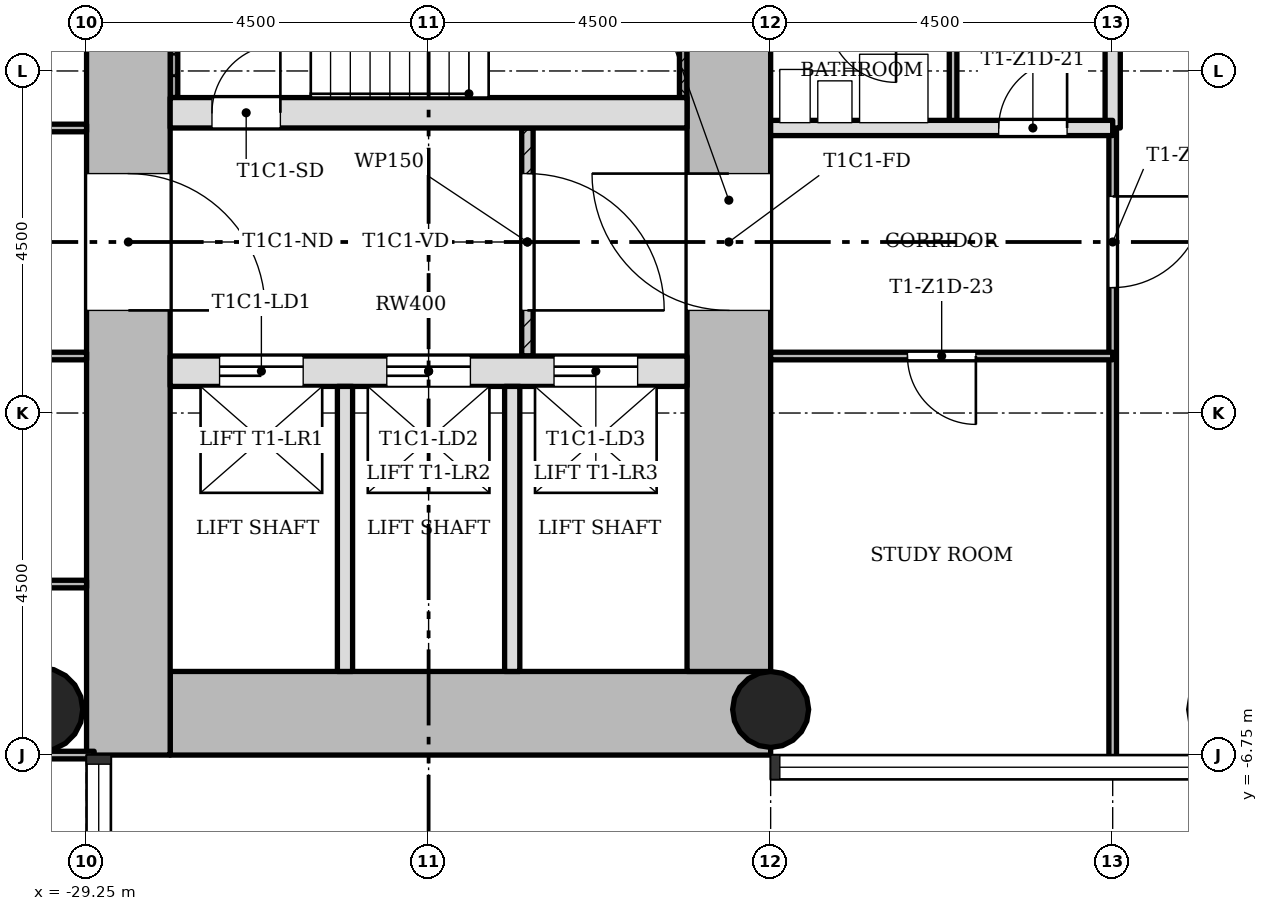
"""IFC4 building model, lengths in metres.
Left out: names, types, materials, properties, quantities, classifications, styles, units other than length and angle.
Written with IfcOpenShell. Run it as: python <this file> out.ifc"""

import sys

from ifc_helpers import new_model, si_unit, direction, frame, frame_2d, origin, origin_2d, place, context, subcontext, project, spatial, rectangle, hollow_circle, extrude, element, fill, save


model = new_model("IFC4")
c1 = context("Model", 3, precision=1e-05, world=origin(), true_north=direction((0.0, 1.0)))
c2 = subcontext(c1, "Body", "Model", "MODEL_VIEW")
j1 = project(units=[si_unit("LENGTHUNIT", "METRE"), si_unit("PLANEANGLEUNIT", "RADIAN")], contexts=[c1])
p1 = place(None, origin())
s1 = spatial("IfcSite", under=j1, at=p1, CompositionType="ELEMENT")
p2 = place(p1, origin())
s2 = spatial("IfcBuilding", under=s1, at=p2, CompositionType="ELEMENT")
p3 = place(p2, frame((0.0, 0.0, 61.9)))
s3 = spatial("IfcBuildingStorey", under=s2, at=p3, CompositionType="ELEMENT", Elevation=61.9)
p4 = place(p3, frame((-28.15, -6.2, 0.0), z_axis=(0.0, 0.0, 1.0), x_axis=(1.0, 0.0, 0.0)))
e1 = element("IfcWall", 1, at=p4, inside=s3, PredefinedType="SHEAR", context=c2, shape_type="SweptSolid", body=[
    extrude(rectangle(XDim=7.9, YDim=1.1, at=frame_2d((3.95, 0.0))), origin(), (0.0, 0.0, 1.0), 3.4),
])
p5 = place(p3, frame((-20.8, -5.65, 0.0), z_axis=(0.0, 0.0, 1.0), x_axis=(0.0, 1.0, 0.0)))
e2 = element("IfcWall", 2, at=p5, inside=s3, PredefinedType="SHEAR", context=c2, shape_type="SweptSolid", body=[
    extrude(rectangle(XDim=12.4, YDim=1.1, at=frame_2d((6.2, 0.0))), origin(), (0.0, 0.0, 1.0), 3.4),
])
p6 = place(p5, frame((4.75, 0.0, 0.0)))
e3 = element("IfcOpeningElement", 3, at=p6, cuts=e2, PredefinedType="OPENING", context=c2, shape_type="SweptSolid", body=[
    extrude(rectangle(XDim=1.8, YDim=2.1, at=frame_2d((0.9, 1.05))), frame((0.0, 0.56, 0.0), z_axis=(0.0, -1.0, 0.0), x_axis=(1.0, 0.0, 0.0)), (0.0, 0.0, 1.0), 1.12),
])
p7 = place(p3, frame((-28.7, 5.65, 0.0), z_axis=(0.0, 0.0, 1.0), x_axis=(0.0, -1.0, 0.0)))
e4 = element("IfcWall", 4, at=p7, inside=s3, PredefinedType="SHEAR", context=c2, shape_type="SweptSolid", body=[
    extrude(rectangle(XDim=12.4, YDim=1.1, at=frame_2d((6.2, 0.0))), origin(), (0.0, 0.0, 1.0), 3.4),
])
p8 = place(p7, frame((4.75, 0.0, 0.0)))
e5 = element("IfcOpeningElement", 5, at=p8, cuts=e4, PredefinedType="OPENING", context=c2, shape_type="SweptSolid", body=[
    extrude(rectangle(XDim=1.8, YDim=2.1, at=frame_2d((0.9, 1.05))), frame((0.0, 0.56, 0.0), z_axis=(0.0, -1.0, 0.0), x_axis=(1.0, 0.0, 0.0)), (0.0, 0.0, 1.0), 1.12),
])
p9 = place(p3, frame((-28.15, -1.7, 0.0), z_axis=(0.0, 0.0, 1.0), x_axis=(1.0, 0.0, 0.0)))
e6 = element("IfcWall", 6, at=p9, inside=s3, PredefinedType="SHEAR", context=c2, shape_type="SweptSolid", body=[
    extrude(rectangle(XDim=6.8, YDim=0.4, at=frame_2d((3.4, 0.0))), origin(), (0.0, 0.0, 1.0), 3.4),
])
p10 = place(p9, frame((0.65, 0.0, 0.0)))
e7 = element("IfcOpeningElement", 7, at=p10, cuts=e6, PredefinedType="OPENING", context=c2, shape_type="SweptSolid", body=[
    extrude(rectangle(XDim=1.1, YDim=2.1, at=frame_2d((0.55, 1.05))), frame((0.0, 0.21, 0.0), z_axis=(0.0, -1.0, 0.0), x_axis=(1.0, 0.0, 0.0)), (0.0, 0.0, 1.0), 0.42),
])
p11 = place(p9, frame((2.85, 0.0, 0.0)))
e8 = element("IfcOpeningElement", 8, at=p11, cuts=e6, PredefinedType="OPENING", context=c2, shape_type="SweptSolid", body=[
    extrude(rectangle(XDim=1.1, YDim=2.1, at=frame_2d((0.55, 1.05))), frame((0.0, 0.21, 0.0), z_axis=(0.0, -1.0, 0.0), x_axis=(1.0, 0.0, 0.0)), (0.0, 0.0, 1.0), 0.42),
])
p12 = place(p9, frame((5.05, 0.0, 0.0)))
e9 = element("IfcOpeningElement", 9, at=p12, cuts=e6, PredefinedType="OPENING", context=c2, shape_type="SweptSolid", body=[
    extrude(rectangle(XDim=1.1, YDim=2.1, at=frame_2d((0.55, 1.05))), frame((0.0, 0.21, 0.0), z_axis=(0.0, -1.0, 0.0), x_axis=(1.0, 0.0, 0.0)), (0.0, 0.0, 1.0), 0.42),
])
p13 = place(p3, frame((-28.15, 1.7, 0.0), z_axis=(0.0, 0.0, 1.0), x_axis=(1.0, 0.0, 0.0)))
e10 = element("IfcWall", 10, at=p13, inside=s3, PredefinedType="SHEAR", context=c2, shape_type="SweptSolid", body=[
    extrude(rectangle(XDim=6.8, YDim=0.4, at=frame_2d((3.4, 0.0))), origin(), (0.0, 0.0, 1.0), 3.4),
])
p14 = place(p13, frame((0.55, 0.0, 0.0)))
e11 = element("IfcOpeningElement", 11, at=p14, cuts=e10, PredefinedType="OPENING", context=c2, shape_type="SweptSolid", body=[
    extrude(rectangle(XDim=0.9, YDim=2.1, at=frame_2d((0.45, 1.05))), frame((0.0, 0.21, 0.0), z_axis=(0.0, -1.0, 0.0), x_axis=(1.0, 0.0, 0.0)), (0.0, 0.0, 1.0), 0.42),
])
p15 = place(p3, frame((-20.25, -6.15, 0.0), z_axis=(0.0, 0.0, 1.0), x_axis=(1.0, 0.0, 0.0)))
e12 = element("IfcColumn", 12, at=p15, inside=s3, PredefinedType="COLUMN", context=c2, shape_type="SweptSolid", body=[
    extrude(hollow_circle(Radius=0.5, WallThickness=0.036, at=origin_2d()), origin(), (0.0, 0.0, 1.0), 3.4),
])
p16 = place(p3, frame((-29.85, -6.15, 0.0), z_axis=(0.0, 0.0, 1.0), x_axis=(1.0, 0.0, 0.0)))
e13 = element("IfcColumn", 13, at=p16, inside=s3, PredefinedType="COLUMN", context=c2, shape_type="SweptSolid", body=[
    extrude(hollow_circle(Radius=0.55, WallThickness=0.04, at=origin_2d()), origin(), (0.0, 0.0, 1.0), 3.4),
])
p17 = place(p3, frame((-23.45, -1.5, 0.0), z_axis=(0.0, 0.0, 1.0), x_axis=(0.0, 1.0, 0.0)))
e14 = element("IfcWall", 14, at=p17, inside=s3, PredefinedType="PARTITIONING", context=c2, shape_type="SweptSolid", body=[
    extrude(rectangle(XDim=3.0, YDim=0.15, at=frame_2d((1.5, 0.0))), origin(), (0.0, 0.0, 1.0), 3.0),
])
p18 = place(p17, frame((0.6, 0.0, 0.0)))
e15 = element("IfcOpeningElement", 15, at=p18, cuts=e14, PredefinedType="OPENING", context=c2, shape_type="SweptSolid", body=[
    extrude(rectangle(XDim=1.8, YDim=2.1, at=frame_2d((0.9, 1.05))), frame((0.0, 0.085, 0.0), z_axis=(0.0, -1.0, 0.0), x_axis=(1.0, 0.0, 0.0)), (0.0, 0.0, 1.0), 0.17),
])
for number, where, z_axis, x_axis in (
    (16, (-25.85, -5.65, 0.0), (0.0, 0.0, 1.0), (0.0, 1.0, 0.0)),
    (17, (-23.65, -5.65, 0.0), (0.0, 0.0, 1.0), (0.0, 1.0, 0.0)),
):
    element("IfcWall", number, at=place(p3, frame(where, z_axis=z_axis, x_axis=x_axis)), inside=s3, PredefinedType="SOLIDWALL", context=c2, shape_type="SweptSolid", body=[
        extrude(rectangle(XDim=3.75, YDim=0.2, at=frame_2d((1.875, 0.0))), origin(), (0.0, 0.0, 1.0), 3.0),
    ])
p19 = place(p3, frame((-17.85, 1.5, 0.0), z_axis=(0.0, 0.0, 1.0), x_axis=(0.0, 1.0, 0.0)))
e18 = element("IfcWall", 18, at=p19, inside=s3, PredefinedType="PARTITIONING", context=c2, shape_type="SweptSolid", body=[
    extrude(rectangle(XDim=1.5, YDim=0.1, at=frame_2d((0.75, 0.0))), origin(), (0.0, 0.0, 1.0), 3.0),
])
p20 = place(p3, frame((-15.75, -6.85, 0.0), z_axis=(0.0, 0.0, 1.0), x_axis=(0.0, 1.0, 0.0)))
e19 = element("IfcWall", 19, at=p20, inside=s3, PredefinedType="PARTITIONING", context=c2, shape_type="SweptSolid", body=[
    extrude(rectangle(XDim=8.35, YDim=0.1, at=frame_2d((4.175, 0.0))), origin(), (0.0, 0.0, 1.0), 3.0),
])
p21 = place(p20, frame((6.25, 0.0, 0.0)))
e20 = element("IfcOpeningElement", 20, at=p21, cuts=e19, PredefinedType="OPENING", context=c2, shape_type="SweptSolid", body=[
    extrude(rectangle(XDim=1.2, YDim=2.1, at=frame_2d((0.6, 1.05))), frame((0.0, 0.06, 0.0), z_axis=(0.0, -1.0, 0.0), x_axis=(1.0, 0.0, 0.0)), (0.0, 0.0, 1.0), 0.12),
])
p22 = place(p3, frame((-15.75, 1.5, 0.0), z_axis=(0.0, 0.0, 1.0), x_axis=(0.0, 1.0, 0.0)))
e21 = element("IfcWall", 21, at=p22, inside=s3, PredefinedType="SOLIDWALL", context=c2, shape_type="SweptSolid", body=[
    extrude(rectangle(XDim=5.35, YDim=0.2, at=frame_2d((2.675, 0.0))), origin(), (0.0, 0.0, 1.0), 3.0),
])
p23 = place(p3, frame((-35.1, -6.75, 0.0), z_axis=(0.0, 0.0, 1.0), x_axis=(1.0, 0.0, 0.0)))
e22 = element("IfcWall", 22, at=p23, inside=s3, PredefinedType="PARTITIONING", context=c2, shape_type="SweptSolid", body=[
    extrude(rectangle(XDim=5.95, YDim=0.1, at=frame_2d((2.975, 0.0))), origin(), (0.0, 0.0, 1.0), 3.0),
])
p24 = place(p3, frame((-35.1, -4.5, 0.0), z_axis=(0.0, 0.0, 1.0), x_axis=(1.0, 0.0, 0.0)))
e23 = element("IfcWall", 23, at=p24, inside=s3, PredefinedType="PARTITIONING", context=c2, shape_type="SweptSolid", body=[
    extrude(rectangle(XDim=5.85, YDim=0.1, at=frame_2d((2.925, 0.0))), origin(), (0.0, 0.0, 1.0), 3.0),
])
p25 = place(p3, frame((-35.1, -1.5, 0.0), z_axis=(0.0, 0.0, 1.0), x_axis=(1.0, 0.0, 0.0)))
e24 = element("IfcWall", 24, at=p25, inside=s3, PredefinedType="PARTITIONING", context=c2, shape_type="SweptSolid", body=[
    extrude(rectangle(XDim=5.85, YDim=0.1, at=frame_2d((2.925, 0.0))), origin(), (0.0, 0.0, 1.0), 3.0),
])
p26 = place(p25, frame((2.475, 0.0, 0.0)))
e25 = element("IfcOpeningElement", 25, at=p26, cuts=e24, PredefinedType="OPENING", context=c2, shape_type="SweptSolid", body=[
    extrude(rectangle(XDim=0.9, YDim=2.1, at=frame_2d((0.45, 1.05))), frame((0.0, 0.06, 0.0), z_axis=(0.0, -1.0, 0.0), x_axis=(1.0, 0.0, 0.0)), (0.0, 0.0, 1.0), 0.12),
])
p27 = place(p3, frame((-20.25, -1.5, 0.0), z_axis=(0.0, 0.0, 1.0), x_axis=(1.0, 0.0, 0.0)))
e26 = element("IfcWall", 26, at=p27, inside=s3, PredefinedType="PARTITIONING", context=c2, shape_type="SweptSolid", body=[
    extrude(rectangle(XDim=4.5, YDim=0.1, at=frame_2d((2.25, 0.0))), origin(), (0.0, 0.0, 1.0), 3.0),
])
p28 = place(p27, frame((1.8, 0.0, 0.0)))
e27 = element("IfcOpeningElement", 27, at=p28, cuts=e26, PredefinedType="OPENING", context=c2, shape_type="SweptSolid", body=[
    extrude(rectangle(XDim=0.9, YDim=2.1, at=frame_2d((0.45, 1.05))), frame((0.0, 0.06, 0.0), z_axis=(0.0, -1.0, 0.0), x_axis=(1.0, 0.0, 0.0)), (0.0, 0.0, 1.0), 0.12),
])
p29 = place(p3, frame((-35.1, 1.5, 0.0), z_axis=(0.0, 0.0, 1.0), x_axis=(1.0, 0.0, 0.0)))
e28 = element("IfcWall", 28, at=p29, inside=s3, PredefinedType="PARTITIONING", context=c2, shape_type="SweptSolid", body=[
    extrude(rectangle(XDim=5.85, YDim=0.1, at=frame_2d((2.925, 0.0))), origin(), (0.0, 0.0, 1.0), 3.0),
])
p30 = place(p29, frame((3.675, 0.0, 0.0)))
e29 = element("IfcOpeningElement", 29, at=p30, cuts=e28, PredefinedType="OPENING", context=c2, shape_type="SweptSolid", body=[
    extrude(rectangle(XDim=0.9, YDim=2.1, at=frame_2d((0.45, 1.05))), frame((0.0, 0.06, 0.0), z_axis=(0.0, -1.0, 0.0), x_axis=(1.0, 0.0, 0.0)), (0.0, 0.0, 1.0), 0.12),
])
p31 = place(p3, frame((-20.25, 1.5, 0.0), z_axis=(0.0, 0.0, 1.0), x_axis=(1.0, 0.0, 0.0)))
e30 = element("IfcWall", 30, at=p31, inside=s3, PredefinedType="SOLIDWALL", context=c2, shape_type="SweptSolid", body=[
    extrude(rectangle(XDim=4.5, YDim=0.2, at=frame_2d((2.25, 0.0))), origin(), (0.0, 0.0, 1.0), 3.0),
])
p32 = place(p31, frame((3.0, 0.0, 0.0)))
e31 = element("IfcOpeningElement", 31, at=p32, cuts=e30, PredefinedType="OPENING", context=c2, shape_type="SweptSolid", body=[
    extrude(rectangle(XDim=0.9, YDim=2.1, at=frame_2d((0.45, 1.05))), frame((0.0, 0.11, 0.0), z_axis=(0.0, -1.0, 0.0), x_axis=(1.0, 0.0, 0.0)), (0.0, 0.0, 1.0), 0.22),
])
for number, where, z_axis, x_axis in (
    (32, (-21.4, 1.9, 0.0), (0.0, 0.0, 1.0), (0.0, 1.0, 0.0)),
    (33, (-28.1, 1.9, 0.0), (0.0, 0.0, 1.0), (0.0, 1.0, 0.0)),
):
    element("IfcWall", number, at=place(p3, frame(where, z_axis=z_axis, x_axis=x_axis)), inside=s3, PredefinedType="SHEAR", context=c2, shape_type="SweptSolid", body=[
        extrude(rectangle(XDim=3.75, YDim=0.1, at=frame_2d((1.875, 0.0))), origin(), (0.0, 0.0, 1.0), 3.4),
    ])
p33 = place(p18, origin())
e34 = element("IfcDoor", 34, at=p33, inside=s3, OperationType="SINGLE_SWING_LEFT", PredefinedType="DOOR", context=c2, shape_type="SweptSolid", body=[
    extrude(rectangle(XDim=1.8, YDim=2.1, at=frame_2d((0.9, 1.05))), frame((0.0, 0.025, 0.0), z_axis=(0.0, -1.0, 0.0), x_axis=(1.0, 0.0, 0.0)), (0.0, 0.0, 1.0), 0.05),
])
fill(e15, e34)
p34 = place(p32, origin())
e35 = element("IfcDoor", 35, at=p34, inside=s3, OperationType="SINGLE_SWING_LEFT", PredefinedType="DOOR", context=c2, shape_type="SweptSolid", body=[
    extrude(rectangle(XDim=0.9, YDim=2.1, at=frame_2d((0.45, 1.05))), frame((0.0, 0.025, 0.0), z_axis=(0.0, -1.0, 0.0), x_axis=(1.0, 0.0, 0.0)), (0.0, 0.0, 1.0), 0.05),
])
fill(e31, e35)
p35 = place(p28, origin())
e36 = element("IfcDoor", 36, at=p35, inside=s3, OperationType="SINGLE_SWING_RIGHT", PredefinedType="DOOR", context=c2, shape_type="SweptSolid", body=[
    extrude(rectangle(XDim=0.9, YDim=2.1, at=frame_2d((0.45, 1.05))), frame((0.0, 0.025, 0.0), z_axis=(0.0, -1.0, 0.0), x_axis=(1.0, 0.0, 0.0)), (0.0, 0.0, 1.0), 0.05),
])
fill(e27, e36)
p36 = place(p21, origin())
e37 = element("IfcDoor", 37, at=p36, inside=s3, OperationType="SINGLE_SWING_RIGHT", PredefinedType="DOOR", context=c2, shape_type="SweptSolid", body=[
    extrude(rectangle(XDim=1.2, YDim=2.1, at=frame_2d((0.6, 1.05))), frame((0.0, 0.025, 0.0), z_axis=(0.0, -1.0, 0.0), x_axis=(1.0, 0.0, 0.0)), (0.0, 0.0, 1.0), 0.05),
])
fill(e20, e37)
p37 = place(p14, origin())
e38 = element("IfcDoor", 38, at=p37, inside=s3, OperationType="SINGLE_SWING_LEFT", PredefinedType="DOOR", context=c2, shape_type="SweptSolid", body=[
    extrude(rectangle(XDim=0.9, YDim=2.1, at=frame_2d((0.45, 1.05))), frame((0.0, 0.025, 0.0), z_axis=(0.0, -1.0, 0.0), x_axis=(1.0, 0.0, 0.0)), (0.0, 0.0, 1.0), 0.05),
])
fill(e11, e38)
p38 = place(p10, origin())
e39 = element("IfcDoor", 39, at=p38, inside=s3, OperationType="SLIDING_TO_LEFT", PredefinedType="DOOR", context=c2, shape_type="SweptSolid", body=[
    extrude(rectangle(XDim=1.1, YDim=2.1, at=frame_2d((0.55, 1.05))), frame((0.0, 0.025, 0.0), z_axis=(0.0, -1.0, 0.0), x_axis=(1.0, 0.0, 0.0)), (0.0, 0.0, 1.0), 0.05),
])
fill(e7, e39)
p39 = place(p11, origin())
e40 = element("IfcDoor", 40, at=p39, inside=s3, OperationType="SLIDING_TO_LEFT", PredefinedType="DOOR", context=c2, shape_type="SweptSolid", body=[
    extrude(rectangle(XDim=1.1, YDim=2.1, at=frame_2d((0.55, 1.05))), frame((0.0, 0.025, 0.0), z_axis=(0.0, -1.0, 0.0), x_axis=(1.0, 0.0, 0.0)), (0.0, 0.0, 1.0), 0.05),
])
fill(e8, e40)
p40 = place(p12, origin())
e41 = element("IfcDoor", 41, at=p40, inside=s3, OperationType="SLIDING_TO_LEFT", PredefinedType="DOOR", context=c2, shape_type="SweptSolid", body=[
    extrude(rectangle(XDim=1.1, YDim=2.1, at=frame_2d((0.55, 1.05))), frame((0.0, 0.025, 0.0), z_axis=(0.0, -1.0, 0.0), x_axis=(1.0, 0.0, 0.0)), (0.0, 0.0, 1.0), 0.05),
])
fill(e9, e41)
p41 = place(p8, origin())
e42 = element("IfcDoor", 42, at=p41, inside=s3, OperationType="SINGLE_SWING_LEFT", PredefinedType="DOOR", context=c2, shape_type="SweptSolid", body=[
    extrude(rectangle(XDim=1.8, YDim=2.1, at=frame_2d((0.9, 1.05))), frame((0.0, 0.025, 0.0), z_axis=(0.0, -1.0, 0.0), x_axis=(1.0, 0.0, 0.0)), (0.0, 0.0, 1.0), 0.05),
])
fill(e5, e42)
p42 = place(p6, origin())
e43 = element("IfcDoor", 43, at=p42, inside=s3, OperationType="SINGLE_SWING_LEFT", PredefinedType="DOOR", context=c2, shape_type="SweptSolid", body=[
    extrude(rectangle(XDim=1.8, YDim=2.1, at=frame_2d((0.9, 1.05))), frame((0.0, 0.025, 0.0), z_axis=(0.0, -1.0, 0.0), x_axis=(1.0, 0.0, 0.0)), (0.0, 0.0, 1.0), 0.05),
])
fill(e3, e43)
save(model, sys.argv[1])
